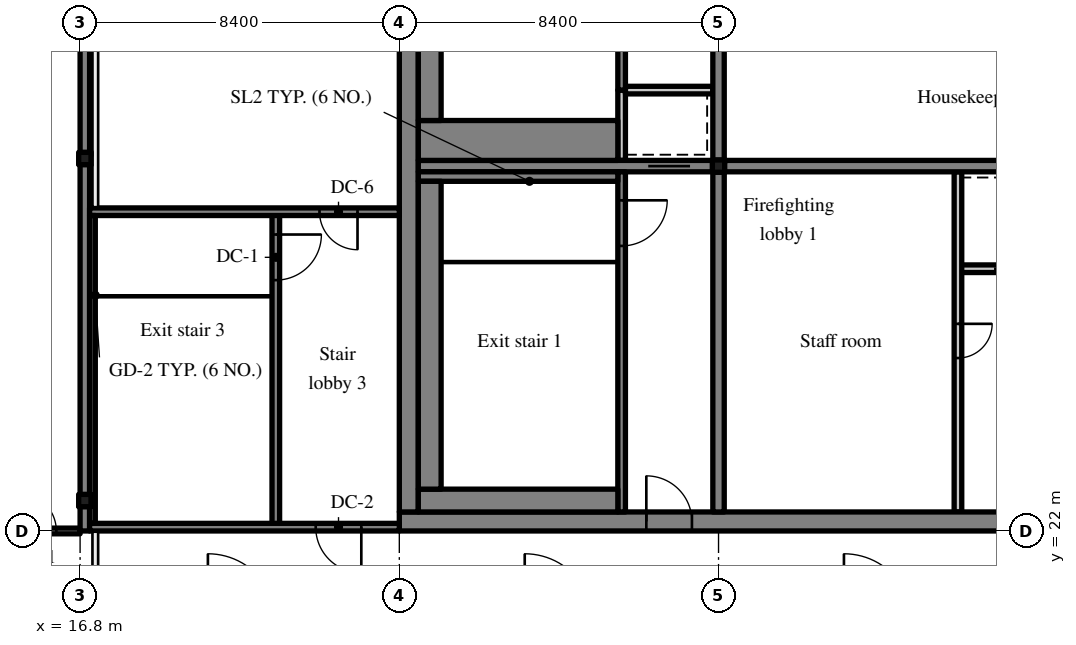
"""IFC4 building model, lengths in metres.
Left out: names, types, materials, properties, quantities, classifications, styles, units other than length and angle.
Written with IfcOpenShell. Run it as: python <this file> out.ifc"""

import sys

from ifc_helpers import new_model, si_unit, direction, frame, frame_2d, origin, origin_2d, place, context, subcontext, project, spatial, rectangle, hollow_circle, extrude, source, transform, mapped, element, fill, save


model = new_model("IFC4")
c1 = context("Model", 3, precision=1e-05, world=origin(), true_north=direction((0.0, 1.0)))
c2 = subcontext(c1, "Body", "Model", "MODEL_VIEW")
j1 = project(units=[si_unit("LENGTHUNIT", "METRE"), si_unit("PLANEANGLEUNIT", "RADIAN")], contexts=[c1])
p1 = place(None, origin())
s1 = spatial("IfcSite", under=j1, at=p1, CompositionType="ELEMENT")
p2 = place(p1, origin())
s2 = spatial("IfcBuilding", under=s1, at=p2, CompositionType="ELEMENT")
p3 = place(p2, frame((0.0, 0.0, 329.7)))
s3 = spatial("IfcBuildingStorey", under=s2, at=p3, CompositionType="ELEMENT", Elevation=329.7)
m1 = source(origin(), c2, "Body", "SweptSolid", [
    extrude(rectangle(XDim=50.4, YDim=0.5, at=frame_2d((25.2, 0.0))), origin(), (0.0, 0.0, 1.0), 4.72),
])
p4 = place(p3, frame((25.2, 22.25, 0.0), z_axis=(0.0, 0.0, 1.0), x_axis=(1.0, 0.0, 0.0)))
e1 = element("IfcWall", 1, at=p4, inside=s3, PredefinedType="SHEAR", context=c2, shape_type="MappedRepresentation", body=[
    mapped(m1, transform((0.0, 0.0, 0.0), scale=1.0)),
])
m2 = source(origin(), c2, "Body", "SweptSolid", [
    extrude(rectangle(XDim=1.8, YDim=2.1, at=frame_2d((0.9, 1.05))), frame((0.0, 0.26, 0.0), z_axis=(0.0, -1.0, 0.0), x_axis=(1.0, 0.0, 0.0)), (0.0, 0.0, 1.0), 0.52),
])
p5 = place(p4, frame((15.9, 0.0, 0.0)))
e2 = element("IfcOpeningElement", 2, at=p5, cuts=e1, PredefinedType="OPENING", context=c2, shape_type="MappedRepresentation", body=[
    mapped(m2, transform((0.0, 0.0, 0.0), scale=1.0)),
])
m3 = source(origin(), c2, "Body", "SweptSolid", [
    extrude(rectangle(XDim=0.9, YDim=2.1, at=frame_2d((0.45, 1.05))), frame((0.0, 0.26, 0.0), z_axis=(0.0, -1.0, 0.0), x_axis=(1.0, 0.0, 0.0)), (0.0, 0.0, 1.0), 0.52),
])
p6 = place(p4, frame((21.525, 0.0, 0.0)))
e3 = element("IfcOpeningElement", 3, at=p6, cuts=e1, PredefinedType="OPENING", context=c2, shape_type="MappedRepresentation", body=[
    mapped(m3, transform((0.0, 0.0, 0.0), scale=1.0)),
])
p7 = place(p4, frame((32.7, 0.0, 0.0)))
e4 = element("IfcOpeningElement", 4, at=p7, cuts=e1, PredefinedType="OPENING", context=c2, shape_type="MappedRepresentation", body=[
    mapped(m2, transform((0.0, 0.0, 0.0), scale=1.0)),
])
p8 = place(p4, frame((39.825, 0.0, 0.0)))
e5 = element("IfcOpeningElement", 5, at=p8, cuts=e1, PredefinedType="OPENING", context=c2, shape_type="MappedRepresentation", body=[
    mapped(m3, transform((0.0, 0.0, 0.0), scale=1.0)),
])
p9 = place(p4, frame((27.975, 0.0, 0.0)))
e6 = element("IfcOpeningElement", 6, at=p9, cuts=e1, PredefinedType="OPENING", context=c2, shape_type="MappedRepresentation", body=[
    mapped(m3, transform((0.0, 0.0, 0.0), scale=1.0)),
])
m4 = source(origin(), c2, "Body", "SweptSolid", [
    extrude(rectangle(XDim=1.2, YDim=2.1, at=frame_2d((0.6, 1.05))), frame((0.0, 0.26, 0.0), z_axis=(0.0, -1.0, 0.0), x_axis=(1.0, 0.0, 0.0)), (0.0, 0.0, 1.0), 0.52),
])
p10 = place(p4, frame((6.5, 0.0, 0.0)))
e7 = element("IfcOpeningElement", 7, at=p10, cuts=e1, PredefinedType="OPENING", context=c2, shape_type="MappedRepresentation", body=[
    mapped(m4, transform((0.0, 0.0, 0.0), scale=1.0)),
])
p11 = place(p4, frame((47.975, 0.0, 0.0)))
e8 = element("IfcOpeningElement", 8, at=p11, cuts=e1, PredefinedType="OPENING", context=c2, shape_type="MappedRepresentation", body=[
    mapped(m4, transform((0.0, 0.0, 0.0), scale=1.0)),
])
m5 = source(origin(), c2, "Body", "SweptSolid", [
    extrude(rectangle(XDim=19.0, YDim=0.5, at=frame_2d((9.5, 0.0))), origin(), (0.0, 0.0, 1.0), 4.72),
])
p12 = place(p3, frame((25.45, 22.5, 0.0), z_axis=(0.0, 0.0, 1.0), x_axis=(0.0, 1.0, 0.0)))
e9 = element("IfcWall", 9, at=p12, inside=s3, PredefinedType="SHEAR", context=c2, shape_type="MappedRepresentation", body=[
    mapped(m5, transform((0.0, 0.0, 0.0), scale=1.0)),
])
m6 = source(origin(), c2, "Body", "SweptSolid", [
    extrude(rectangle(XDim=19.0, YDim=0.3, at=frame_2d((9.5, 0.0))), origin(), (0.0, 0.0, 1.0), 4.72),
])
p13 = place(p3, frame((33.6, 22.5, 0.0), z_axis=(0.0, 0.0, 1.0), x_axis=(0.0, 1.0, 0.0)))
e10 = element("IfcWall", 10, at=p13, inside=s3, PredefinedType="SHEAR", context=c2, shape_type="MappedRepresentation", body=[
    mapped(m6, transform((0.0, 0.0, 0.0), scale=1.0)),
])
m7 = source(origin(), c2, "Body", "SweptSolid", [
    extrude(rectangle(XDim=1.1, YDim=2.1, at=frame_2d((0.55, 1.05))), frame((0.0, 0.16, 0.0), z_axis=(0.0, -1.0, 0.0), x_axis=(1.0, 0.0, 0.0)), (0.0, 0.0, 1.0), 0.32),
])
p14 = place(p13, frame((12.95, 0.0, 0.0)))
e11 = element("IfcOpeningElement", 11, at=p14, cuts=e10, PredefinedType="OPENING", context=c2, shape_type="MappedRepresentation", body=[
    mapped(m7, transform((0.0, 0.0, 0.0), scale=1.0)),
])
m8 = source(origin(), c2, "Body", "SweptSolid", [
    extrude(rectangle(XDim=7.75, YDim=0.3, at=frame_2d((3.875, 0.0))), origin(), (0.0, 0.0, 1.0), 4.72),
])
p15 = place(p3, frame((25.7, 31.6, 0.0), z_axis=(0.0, 0.0, 1.0), x_axis=(1.0, 0.0, 0.0)))
e12 = element("IfcWall", 12, at=p15, inside=s3, PredefinedType="SHEAR", context=c2, shape_type="MappedRepresentation", body=[
    mapped(m8, transform((0.0, 0.0, 0.0), scale=1.0)),
])
p16 = place(p15, frame((6.05, 0.0, 0.0)))
e13 = element("IfcOpeningElement", 13, at=p16, cuts=e12, PredefinedType="OPENING", context=c2, shape_type="MappedRepresentation", body=[
    mapped(m7, transform((0.0, 0.0, 0.0), scale=1.0)),
])
m9 = source(origin(), c2, "Body", "SweptSolid", [
    extrude(rectangle(XDim=16.5, YDim=0.3, at=frame_2d((8.25, 0.0))), origin(), (0.0, 0.0, 1.0), 4.72),
])
p17 = place(p3, frame((33.75, 31.6, 0.0), z_axis=(0.0, 0.0, 1.0), x_axis=(1.0, 0.0, 0.0)))
e14 = element("IfcWall", 14, at=p17, inside=s3, PredefinedType="SHEAR", context=c2, shape_type="MappedRepresentation", body=[
    mapped(m9, transform((0.0, 0.0, 0.0), scale=1.0)),
])
m10 = source(origin(), c2, "Body", "SweptSolid", [
    extrude(rectangle(XDim=1.0, YDim=2.1, at=frame_2d((0.5, 1.05))), frame((0.0, 0.16, 0.0), z_axis=(0.0, -1.0, 0.0), x_axis=(1.0, 0.0, 0.0)), (0.0, 0.0, 1.0), 0.32),
])
p18 = place(p17, frame((14.875, 0.0, 0.0)))
e15 = element("IfcOpeningElement", 15, at=p18, cuts=e14, PredefinedType="OPENING", context=c2, shape_type="MappedRepresentation", body=[
    mapped(m10, transform((0.0, 0.0, 0.0), scale=1.0)),
])
m11 = source(origin(), c2, "Body", "SweptSolid", [
    extrude(rectangle(XDim=18.4, YDim=0.25, at=frame_2d((9.2, 0.0))), origin(), (0.0, 0.0, 1.0), 4.72),
])
p19 = place(p3, frame((16.925, 22.0, 0.0), z_axis=(0.0, 0.0, 1.0), x_axis=(0.0, 1.0, 0.0)))
e16 = element("IfcWall", 16, at=p19, inside=s3, PredefinedType="SHEAR", context=c2, shape_type="MappedRepresentation", body=[
    mapped(m11, transform((0.0, 0.0, 0.0), scale=1.0)),
])
m12 = source(origin(), c2, "Body", "SweptSolid", [
    extrude(hollow_circle(Radius=0.162, WallThickness=0.012, at=origin_2d()), origin(), (0.0, 0.0, 1.0), 4.4),
])
for number, where, z_axis, x_axis in (
    (17, (16.925, 22.8, 5.0), (0.0, 0.0, 1.0), (1.0, 0.0, 0.0)),
    (18, (16.925, 31.8, 5.0), (0.0, 0.0, 1.0), (1.0, 0.0, 0.0)),
    (19, (33.6, 31.6, 5.0), (0.0, 0.0, 1.0), (1.0, 0.0, 0.0)),
):
    element("IfcColumn", number, at=place(p3, frame(where, z_axis=z_axis, x_axis=x_axis)), inside=s3, PredefinedType="COLUMN", context=c2, shape_type="MappedRepresentation", body=[
        mapped(m12, transform((0.0, 0.0, 0.0), scale=1.0)),
    ])
m13 = source(origin(), c2, "Body", "SweptSolid", [
    extrude(rectangle(XDim=6.0, YDim=0.2, at=frame_2d((3.0, 0.0))), origin(), (0.0, 0.0, 1.0), 4.72),
])
p20 = place(p3, frame((39.9, 28.9, 0.0), z_axis=(0.0, 0.0, 1.0), x_axis=(1.0, 0.0, 0.0)))
e20 = element("IfcWall", 20, at=p20, inside=s3, PredefinedType="SOLIDWALL", context=c2, shape_type="MappedRepresentation", body=[
    mapped(m13, transform((0.0, 0.0, 0.0), scale=1.0)),
])
m14 = source(origin(), c2, "Body", "SweptSolid", [
    extrude(rectangle(XDim=1.1, YDim=2.1, at=frame_2d((0.55, 1.05))), frame((0.0, 0.11, 0.0), z_axis=(0.0, -1.0, 0.0), x_axis=(1.0, 0.0, 0.0)), (0.0, 0.0, 1.0), 0.22),
])
p21 = place(p20, frame((0.95, 0.0, 0.0)))
e21 = element("IfcOpeningElement", 21, at=p21, cuts=e20, PredefinedType="OPENING", context=c2, shape_type="MappedRepresentation", body=[
    mapped(m14, transform((0.0, 0.0, 0.0), scale=1.0)),
])
p22 = place(p20, frame((3.95, 0.0, 0.0)))
e22 = element("IfcOpeningElement", 22, at=p22, cuts=e20, PredefinedType="OPENING", context=c2, shape_type="MappedRepresentation", body=[
    mapped(m14, transform((0.0, 0.0, 0.0), scale=1.0)),
])
m15 = source(origin(), c2, "Body", "SweptSolid", [
    extrude(rectangle(XDim=8.95, YDim=0.2, at=frame_2d((4.475, 0.0))), origin(), (0.0, 0.0, 1.0), 4.72),
])
p23 = place(p3, frame((39.9, 22.5, 0.0), z_axis=(0.0, 0.0, 1.0), x_axis=(0.0, 1.0, 0.0)))
e23 = element("IfcWall", 23, at=p23, inside=s3, PredefinedType="PARTITIONING", context=c2, shape_type="MappedRepresentation", body=[
    mapped(m15, transform((0.0, 0.0, 0.0), scale=1.0)),
])
m16 = source(origin(), c2, "Body", "SweptSolid", [
    extrude(rectangle(XDim=0.9, YDim=2.1, at=frame_2d((0.45, 1.05))), frame((0.0, 0.11, 0.0), z_axis=(0.0, -1.0, 0.0), x_axis=(1.0, 0.0, 0.0)), (0.0, 0.0, 1.0), 0.22),
])
p24 = place(p23, frame((4.05, 0.0, 0.0)))
e24 = element("IfcOpeningElement", 24, at=p24, cuts=e23, PredefinedType="OPENING", context=c2, shape_type="MappedRepresentation", body=[
    mapped(m16, transform((0.0, 0.0, 0.0), scale=1.0)),
])
m17 = source(origin(), c2, "Body", "SweptSolid", [
    extrude(rectangle(XDim=8.95, YDim=0.2, at=frame_2d((4.475, 0.0))), origin(), (0.0, 0.0, 1.0), 4.72),
])
p25 = place(p3, frame((31.05, 22.5, 0.0), z_axis=(0.0, 0.0, 1.0), x_axis=(0.0, 1.0, 0.0)))
e25 = element("IfcWall", 25, at=p25, inside=s3, PredefinedType="SOLIDWALL", context=c2, shape_type="MappedRepresentation", body=[
    mapped(m17, transform((0.0, 0.0, 0.0), scale=1.0)),
])
m18 = source(origin(), c2, "Body", "SweptSolid", [
    extrude(rectangle(XDim=1.2, YDim=2.1, at=frame_2d((0.6, 1.05))), frame((0.0, 0.11, 0.0), z_axis=(0.0, -1.0, 0.0), x_axis=(1.0, 0.0, 0.0)), (0.0, 0.0, 1.0), 0.22),
])
p26 = place(p25, frame((7.0, 0.0, 0.0)))
e26 = element("IfcOpeningElement", 26, at=p26, cuts=e25, PredefinedType="OPENING", context=c2, shape_type="MappedRepresentation", body=[
    mapped(m18, transform((0.0, 0.0, 0.0), scale=1.0)),
])
m19 = source(origin(), c2, "Body", "SweptSolid", [
    extrude(rectangle(XDim=1.85, YDim=0.2, at=frame_2d((0.925, 0.0))), origin(), (0.0, 0.0, 1.0), 4.72),
])
p27 = place(p3, frame((31.05, 31.75, 0.0), z_axis=(0.0, 0.0, 1.0), x_axis=(0.0, 1.0, 0.0)))
e27 = element("IfcWall", 27, at=p27, inside=s3, PredefinedType="SOLIDWALL", context=c2, shape_type="MappedRepresentation", body=[
    mapped(m19, transform((0.0, 0.0, 0.0), scale=1.0)),
])
m20 = source(origin(), c2, "Body", "SweptSolid", [
    extrude(rectangle(XDim=2.3, YDim=0.2, at=frame_2d((1.15, 0.0))), origin(), (0.0, 0.0, 1.0), 4.72),
])
p28 = place(p3, frame((31.15, 33.6, 0.0), z_axis=(0.0, 0.0, 1.0), x_axis=(1.0, 0.0, 0.0)))
e28 = element("IfcWall", 28, at=p28, inside=s3, PredefinedType="SOLIDWALL", context=c2, shape_type="MappedRepresentation", body=[
    mapped(m20, transform((0.0, 0.0, 0.0), scale=1.0)),
])
m21 = source(origin(), c2, "Body", "SweptSolid", [
    extrude(rectangle(XDim=7.9, YDim=0.2, at=frame_2d((3.95, 0.0))), origin(), (0.0, 0.0, 1.0), 4.72),
])
p29 = place(p3, frame((31.05, 33.6, 0.0), z_axis=(0.0, 0.0, 1.0), x_axis=(0.0, 1.0, 0.0)))
e29 = element("IfcWall", 29, at=p29, inside=s3, PredefinedType="SOLIDWALL", context=c2, shape_type="MappedRepresentation", body=[
    mapped(m21, transform((0.0, 0.0, 0.0), scale=1.0)),
])
m22 = source(origin(), c2, "Body", "SweptSolid", [
    extrude(rectangle(XDim=1.8, YDim=2.1, at=frame_2d((0.9, 1.05))), frame((0.0, 0.11, 0.0), z_axis=(0.0, -1.0, 0.0), x_axis=(1.0, 0.0, 0.0)), (0.0, 0.0, 1.0), 0.22),
])
p30 = place(p29, frame((5.3, 0.0, 0.0)))
e30 = element("IfcOpeningElement", 30, at=p30, cuts=e29, PredefinedType="OPENING", context=c2, shape_type="MappedRepresentation", body=[
    mapped(m22, transform((0.0, 0.0, 0.0), scale=1.0)),
])
m23 = source(origin(), c2, "Body", "SweptSolid", [
    extrude(rectangle(XDim=8.3, YDim=0.2, at=frame_2d((4.15, 0.0))), origin(), (0.0, 0.0, 1.0), 4.72),
])
p31 = place(p3, frame((21.95, 22.1, 0.0), z_axis=(0.0, 0.0, 1.0), x_axis=(0.0, 1.0, 0.0)))
e31 = element("IfcWall", 31, at=p31, inside=s3, PredefinedType="SOLIDWALL", context=c2, shape_type="MappedRepresentation", body=[
    mapped(m23, transform((0.0, 0.0, 0.0), scale=1.0)),
])
p32 = place(p31, frame((6.5, 0.0, 0.0)))
e32 = element("IfcOpeningElement", 32, at=p32, cuts=e31, PredefinedType="OPENING", context=c2, shape_type="MappedRepresentation", body=[
    mapped(m18, transform((0.0, 0.0, 0.0), scale=1.0)),
])
m24 = source(origin(), c2, "Body", "SweptSolid", [
    extrude(rectangle(XDim=8.15, YDim=0.2, at=frame_2d((4.075, 0.0))), origin(), (0.0, 0.0, 1.0), 4.72),
])
p33 = place(p3, frame((17.05, 22.1, 0.0), z_axis=(0.0, 0.0, 1.0), x_axis=(1.0, 0.0, 0.0)))
e33 = element("IfcWall", 33, at=p33, inside=s3, PredefinedType="SOLIDWALL", context=c2, shape_type="MappedRepresentation", body=[
    mapped(m24, transform((0.0, 0.0, 0.0), scale=1.0)),
])
p34 = place(p33, frame((5.95, 0.0, 0.0)))
e34 = element("IfcOpeningElement", 34, at=p34, cuts=e33, PredefinedType="OPENING", context=c2, shape_type="MappedRepresentation", body=[
    mapped(m18, transform((0.0, 0.0, 0.0), scale=1.0)),
])
p35 = place(p3, frame((17.05, 30.4, 0.0), z_axis=(0.0, 0.0, 1.0), x_axis=(1.0, 0.0, 0.0)))
e35 = element("IfcWall", 35, at=p35, inside=s3, PredefinedType="SOLIDWALL", context=c2, shape_type="MappedRepresentation", body=[
    mapped(m24, transform((0.0, 0.0, 0.0), scale=1.0)),
])
m25 = source(origin(), c2, "Body", "SweptSolid", [
    extrude(rectangle(XDim=1.0, YDim=2.1, at=frame_2d((0.5, 1.05))), frame((0.0, 0.11, 0.0), z_axis=(0.0, -1.0, 0.0), x_axis=(1.0, 0.0, 0.0)), (0.0, 0.0, 1.0), 0.22),
])
p36 = place(p35, frame((6.05, 0.0, 0.0)))
e36 = element("IfcOpeningElement", 36, at=p36, cuts=e35, PredefinedType="OPENING", context=c2, shape_type="MappedRepresentation", body=[
    mapped(m25, transform((0.0, 0.0, 0.0), scale=1.0)),
])
m26 = source(origin(), c2, "Body", "SweptSolid", [
    extrude(rectangle(XDim=5.25, YDim=0.6, at=frame_2d((2.625, 0.0))), origin(), (0.0, 0.0, 1.0), 4.72),
])
p37 = place(p3, frame((25.7, 22.8, 0.0), z_axis=(0.0, 0.0, 1.0), x_axis=(1.0, 0.0, 0.0)))
e37 = element("IfcWall", 37, at=p37, inside=s3, PredefinedType="SOLIDWALL", context=c2, shape_type="MappedRepresentation", body=[
    mapped(m26, transform((0.0, 0.0, 0.0), scale=1.0)),
])
m27 = source(origin(), c2, "Body", "SweptSolid", [
    extrude(rectangle(XDim=5.25, YDim=0.25, at=frame_2d((2.625, 0.0))), origin(), (0.0, 0.0, 1.0), 4.72),
])
p38 = place(p3, frame((25.7, 31.325, 0.0), z_axis=(0.0, 0.0, 1.0), x_axis=(1.0, 0.0, 0.0)))
e38 = element("IfcWall", 38, at=p38, inside=s3, PredefinedType="SOLIDWALL", context=c2, shape_type="MappedRepresentation", body=[
    mapped(m27, transform((0.0, 0.0, 0.0), scale=1.0)),
])
m28 = source(origin(), c2, "Body", "SweptSolid", [
    extrude(rectangle(XDim=8.1, YDim=0.6, at=frame_2d((4.05, 0.0))), origin(), (0.0, 0.0, 1.0), 4.72),
])
p39 = place(p3, frame((26.0, 23.1, 0.0), z_axis=(0.0, 0.0, 1.0), x_axis=(0.0, 1.0, 0.0)))
e39 = element("IfcWall", 39, at=p39, inside=s3, PredefinedType="SOLIDWALL", context=c2, shape_type="MappedRepresentation", body=[
    mapped(m28, transform((0.0, 0.0, 0.0), scale=1.0)),
])
m29 = source(origin(), c2, "Body", "SweptSolid", [
    extrude(rectangle(XDim=8.1, YDim=0.15, at=frame_2d((4.05, 0.0))), origin(), (0.0, 0.0, 1.0), 4.72),
])
p40 = place(p3, frame((17.125, 22.2, 0.0), z_axis=(0.0, 0.0, 1.0), x_axis=(0.0, 1.0, 0.0)))
e40 = element("IfcWall", 40, at=p40, inside=s3, PredefinedType="SOLIDWALL", context=c2, shape_type="MappedRepresentation", body=[
    mapped(m29, transform((0.0, 0.0, 0.0), scale=1.0)),
])
m30 = source(origin(), c2, "Body", "SweptSolid", [
    extrude(rectangle(XDim=5.25, YDim=1.05, at=frame_2d((2.625, 0.0))), origin(), (0.0, 0.0, 1.0), 4.72),
])
p41 = place(p3, frame((25.7, 32.275, 0.0), z_axis=(0.0, 0.0, 1.0), x_axis=(1.0, 0.0, 0.0)))
e41 = element("IfcWall", 41, at=p41, inside=s3, PredefinedType="SOLIDWALL", context=c2, shape_type="MappedRepresentation", body=[
    mapped(m30, transform((0.0, 0.0, 0.0), scale=1.0)),
])
p42 = place(p3, frame((26.0, 32.8, 0.0), z_axis=(0.0, 0.0, 1.0), x_axis=(0.0, 1.0, 0.0)))
e42 = element("IfcWall", 42, at=p42, inside=s3, PredefinedType="SOLIDWALL", context=c2, shape_type="MappedRepresentation", body=[
    mapped(m28, transform((0.0, 0.0, 0.0), scale=1.0)),
])
m31 = source(origin(), c2, "Body", "SweptSolid", [
    extrude(rectangle(XDim=2.2, YDim=0.15, at=frame_2d((1.1, 0.0))), origin(), (0.0, 0.0, 1.0), 4.02),
])
p43 = place(p3, frame((14.6, 22.0, 0.0), z_axis=(0.0, 0.0, 1.0), x_axis=(1.0, 0.0, 0.0)))
e43 = element("IfcWall", 43, at=p43, inside=s3, PredefinedType="PARTITIONING", context=c2, shape_type="MappedRepresentation", body=[
    mapped(m31, transform((0.0, 0.0, 0.0), scale=1.0)),
])
m32 = source(origin(), c2, "Body", "SweptSolid", [
    extrude(rectangle(XDim=1.0, YDim=2.1, at=frame_2d((0.5, 1.05))), frame((0.0, 0.085, 0.0), z_axis=(0.0, -1.0, 0.0), x_axis=(1.0, 0.0, 0.0)), (0.0, 0.0, 1.0), 0.17),
])
p44 = place(p43, frame((0.575, 0.0, 0.0)))
e44 = element("IfcOpeningElement", 44, at=p44, cuts=e43, PredefinedType="OPENING", context=c2, shape_type="MappedRepresentation", body=[
    mapped(m32, transform((0.0, 0.0, 0.0), scale=1.0)),
])
m33 = source(origin(), c2, "Body", "SweptSolid", [
    extrude(rectangle(XDim=1.1, YDim=2.1, at=frame_2d((0.55, 1.05))), frame((0.0, 0.025, 0.0), z_axis=(0.0, -1.0, 0.0), x_axis=(1.0, 0.0, 0.0)), (0.0, 0.0, 1.0), 0.05),
])
p45 = place(p21, origin())
e45 = element("IfcDoor", 45, at=p45, inside=s3, OperationType="SLIDING_TO_LEFT", PredefinedType="DOOR", context=c2, shape_type="MappedRepresentation", body=[
    mapped(m33, transform((0.0, 0.0, 0.0), scale=1.0)),
])
fill(e21, e45)
m34 = source(origin(), c2, "Body", "SweptSolid", [
    extrude(rectangle(XDim=0.9, YDim=2.1, at=frame_2d((0.45, 1.05))), frame((0.0, 0.025, 0.0), z_axis=(0.0, -1.0, 0.0), x_axis=(1.0, 0.0, 0.0)), (0.0, 0.0, 1.0), 0.05),
])
p46 = place(p24, origin())
e46 = element("IfcDoor", 46, at=p46, inside=s3, OperationType="SINGLE_SWING_RIGHT", PredefinedType="DOOR", context=c2, shape_type="MappedRepresentation", body=[
    mapped(m34, transform((0.0, 0.0, 0.0), scale=1.0)),
])
fill(e24, e46)
m35 = source(origin(), c2, "Body", "SweptSolid", [
    extrude(rectangle(XDim=1.2, YDim=2.1, at=frame_2d((0.6, 1.05))), frame((0.0, 0.025, 0.0), z_axis=(0.0, -1.0, 0.0), x_axis=(1.0, 0.0, 0.0)), (0.0, 0.0, 1.0), 0.05),
])
p47 = place(p26, origin())
e47 = element("IfcDoor", 47, at=p47, inside=s3, OperationType="SINGLE_SWING_RIGHT", PredefinedType="DOOR", context=c2, shape_type="MappedRepresentation", body=[
    mapped(m35, transform((0.0, 0.0, 0.0), scale=1.0)),
])
fill(e26, e47)
m36 = source(origin(), c2, "Body", "SweptSolid", [
    extrude(rectangle(XDim=1.2, YDim=2.1, at=frame_2d((0.6, 1.05))), frame((0.0, 0.175, 0.0), z_axis=(0.0, -1.0, 0.0), x_axis=(1.0, 0.0, 0.0)), (0.0, 0.0, 1.0), 0.05),
])
p48 = place(p10, origin())
e48 = element("IfcDoor", 48, at=p48, inside=s3, OperationType="SINGLE_SWING_LEFT", PredefinedType="DOOR", context=c2, shape_type="MappedRepresentation", body=[
    mapped(m36, transform((0.0, 0.0, 0.0), scale=1.0)),
])
fill(e7, e48)
p49 = place(p16, origin())
e49 = element("IfcDoor", 49, at=p49, inside=s3, OperationType="SLIDING_TO_LEFT", PredefinedType="DOOR", context=c2, shape_type="MappedRepresentation", body=[
    mapped(m33, transform((0.0, 0.0, 0.0), scale=1.0)),
])
fill(e13, e49)
p50 = place(p32, origin())
e50 = element("IfcDoor", 50, at=p50, inside=s3, OperationType="SINGLE_SWING_RIGHT", PredefinedType="DOOR", context=c2, shape_type="MappedRepresentation", body=[
    mapped(m35, transform((0.0, 0.0, 0.0), scale=1.0)),
])
fill(e32, e50)
p51 = place(p34, origin())
e51 = element("IfcDoor", 51, at=p51, inside=s3, OperationType="SINGLE_SWING_RIGHT", PredefinedType="DOOR", context=c2, shape_type="MappedRepresentation", body=[
    mapped(m35, transform((0.0, 0.0, 0.0), scale=1.0)),
])
fill(e34, e51)
m37 = source(origin(), c2, "Body", "SweptSolid", [
    extrude(rectangle(XDim=1.0, YDim=2.1, at=frame_2d((0.5, 1.05))), frame((0.0, 0.025, 0.0), z_axis=(0.0, -1.0, 0.0), x_axis=(1.0, 0.0, 0.0)), (0.0, 0.0, 1.0), 0.05),
])
p52 = place(p36, origin())
e52 = element("IfcDoor", 52, at=p52, inside=s3, OperationType="SINGLE_SWING_RIGHT", PredefinedType="DOOR", context=c2, shape_type="MappedRepresentation", body=[
    mapped(m37, transform((0.0, 0.0, 0.0), scale=1.0)),
])
fill(e36, e52)
p53 = place(p44, origin())
e53 = element("IfcDoor", 53, at=p53, inside=s3, OperationType="SINGLE_SWING_LEFT", PredefinedType="DOOR", context=c2, shape_type="MappedRepresentation", body=[
    mapped(m37, transform((0.0, 0.0, 0.0), scale=1.0)),
])
fill(e44, e53)
save(model, sys.argv[1])
